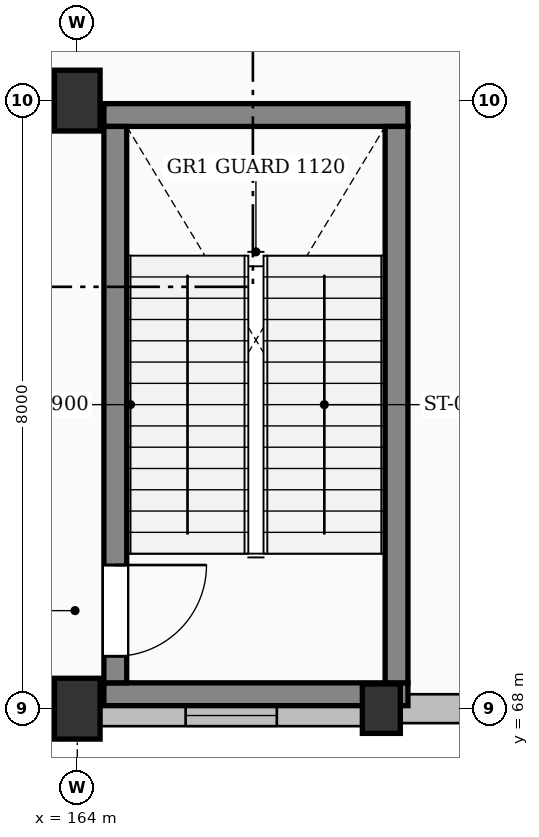
"""IFC4 building model, lengths in metres.
Left out: names, types, materials, properties, quantities, classifications, styles, units other than length and angle.
Written with IfcOpenShell. Run it as: python <this file> out.ifc"""

import sys

from ifc_helpers import new_model, si_unit, direction, frame, frame_2d, origin, origin_2d, place, context, subcontext, project, spatial, rectangle, extrude, element, fill, save


model = new_model("IFC4")
c1 = context("Model", 3, precision=1e-05, world=origin(), true_north=direction((0.0, 1.0)))
c2 = subcontext(c1, "Body", "Model", "MODEL_VIEW")
j1 = project(units=[si_unit("LENGTHUNIT", "METRE"), si_unit("PLANEANGLEUNIT", "RADIAN")], contexts=[c1])
p1 = place(None, origin())
s1 = spatial("IfcSite", under=j1, at=p1, CompositionType="ELEMENT")
p2 = place(p1, origin())
s2 = spatial("IfcBuilding", under=s1, at=p2, CompositionType="ELEMENT")
p3 = place(p2, frame((0.0, 0.0, 9.3)))
s3 = spatial("IfcBuildingStorey", under=s2, at=p3, CompositionType="ELEMENT", Elevation=9.3)
for number, where, z_axis, x_axis in (
    (1, (164.0, 68.0, 0.0), (0.0, 0.0, 1.0), (1.0, 0.0, 0.0)),
    (2, (164.0, 76.0, 0.0), (0.0, 0.0, 1.0), (1.0, 0.0, 0.0)),
):
    element("IfcColumn", number, at=place(p3, frame(where, z_axis=z_axis, x_axis=x_axis)), inside=s3, PredefinedType="COLUMN", context=c2, shape_type="SweptSolid", body=[
        extrude(rectangle(XDim=0.6, YDim=0.8, at=origin_2d()), origin(), (0.0, 0.0, 1.0), 4.5),
    ])
p4 = place(p3, frame((168.0, 68.0, 0.0), z_axis=(0.0, 0.0, 1.0), x_axis=(1.0, 0.0, 0.0)))
e3 = element("IfcColumn", 3, at=p4, inside=s3, PredefinedType="PILASTER", context=c2, shape_type="SweptSolid", body=[
    extrude(rectangle(XDim=0.5, YDim=0.65, at=origin_2d()), origin(), (0.0, 0.0, 1.0), 4.5),
])
p5 = place(p3, frame((171.725, 68.0, 0.0), z_axis=(0.0, 0.0, 1.0), x_axis=(-1.0, 0.0, 0.0)))
e4 = element("IfcWall", 4, at=p5, inside=s3, PredefinedType="SOLIDWALL", context=c2, shape_type="SweptSolid", body=[
    extrude(rectangle(XDim=3.475, YDim=0.38, at=frame_2d((1.738, 0.0))), origin(), (0.0, 0.0, 1.0), 3.705),
])
p6 = place(p5, frame((1.288, 0.0, 0.95)))
e5 = element("IfcOpeningElement", 5, at=p6, cuts=e4, PredefinedType="OPENING", context=c2, shape_type="SweptSolid", body=[
    extrude(rectangle(XDim=0.9, YDim=1.8, at=frame_2d((0.45, 0.9))), frame((0.0, 0.2, 0.0), z_axis=(0.0, -1.0, 0.0), x_axis=(1.0, 0.0, 0.0)), (0.0, 0.0, 1.0), 0.4),
])
p7 = place(p3, frame((167.75, 67.91, 0.0), z_axis=(0.0, 0.0, 1.0), x_axis=(-1.0, 0.0, 0.0)))
e6 = element("IfcWall", 6, at=p7, inside=s3, PredefinedType="SOLIDWALL", context=c2, shape_type="SweptSolid", body=[
    extrude(rectangle(XDim=3.45, YDim=0.28, at=frame_2d((1.725, 0.0))), origin(), (0.0, 0.0, 1.0), 3.705),
])
p8 = place(p7, frame((1.125, 0.0, 0.95)))
e7 = element("IfcOpeningElement", 7, at=p8, cuts=e6, PredefinedType="OPENING", context=c2, shape_type="SweptSolid", body=[
    extrude(rectangle(XDim=1.2, YDim=1.8, at=frame_2d((0.6, 0.9))), frame((0.0, 0.15, 0.0), z_axis=(0.0, -1.0, 0.0), x_axis=(1.0, 0.0, 0.0)), (0.0, 0.0, 1.0), 0.3),
])
p9 = place(p3, frame((163.7, 68.0, 0.0), z_axis=(0.0, 0.0, 1.0), x_axis=(-1.0, 0.0, 0.0)))
e8 = element("IfcWall", 8, at=p9, inside=s3, PredefinedType="SOLIDWALL", context=c2, shape_type="SweptSolid", body=[
    extrude(rectangle(XDim=3.5, YDim=0.38, at=frame_2d((1.75, 0.0))), origin(), (0.0, 0.0, 1.0), 3.755),
])
p10 = place(p9, frame((0.85, 0.0, 0.95)))
e9 = element("IfcOpeningElement", 9, at=p10, cuts=e8, PredefinedType="OPENING", context=c2, shape_type="SweptSolid", body=[
    extrude(rectangle(XDim=1.8, YDim=1.8, at=frame_2d((0.9, 0.9))), frame((0.0, 0.2, 0.0), z_axis=(0.0, -1.0, 0.0), x_axis=(1.0, 0.0, 0.0)), (0.0, 0.0, 1.0), 0.4),
])
for number, where, z_axis, x_axis in (
    (10, (164.35, 68.19, 0.0), (0.0, 0.0, 1.0), (1.0, 0.0, 0.0)),
    (11, (168.35, 75.81, 0.0), (0.0, 0.0, 1.0), (-1.0, 0.0, 0.0)),
):
    element("IfcWall", number, at=place(p3, frame(where, z_axis=z_axis, x_axis=x_axis)), inside=s3, PredefinedType="SHEAR", context=c2, shape_type="SweptSolid", body=[
        extrude(rectangle(XDim=4.0, YDim=0.3, at=frame_2d((2.0, 0.0))), origin(), (0.0, 0.0, 1.0), 4.27),
    ])
p11 = place(p3, frame((164.5, 75.66, 0.0), z_axis=(0.0, 0.0, 1.0), x_axis=(0.0, -1.0, 0.0)))
e12 = element("IfcWall", 12, at=p11, inside=s3, PredefinedType="SHEAR", context=c2, shape_type="SweptSolid", body=[
    extrude(rectangle(XDim=7.32, YDim=0.3, at=frame_2d((3.66, 0.0))), origin(), (0.0, 0.0, 1.0), 4.27),
])
p12 = place(p11, frame((5.77, 0.0, 0.0)))
e13 = element("IfcOpeningElement", 13, at=p12, cuts=e12, PredefinedType="OPENING", context=c2, shape_type="SweptSolid", body=[
    extrude(rectangle(XDim=1.2, YDim=2.15, at=frame_2d((0.6, 1.075))), frame((0.0, 0.16, 0.0), z_axis=(0.0, -1.0, 0.0), x_axis=(1.0, 0.0, 0.0)), (0.0, 0.0, 1.0), 0.32),
])
p13 = place(p3, frame((168.2, 75.66, 0.0), z_axis=(0.0, 0.0, 1.0), x_axis=(0.0, -1.0, 0.0)))
e14 = element("IfcWall", 14, at=p13, inside=s3, PredefinedType="SHEAR", context=c2, shape_type="SweptSolid", body=[
    extrude(rectangle(XDim=7.32, YDim=0.3, at=frame_2d((3.66, 0.0))), origin(), (0.0, 0.0, 1.0), 4.27),
])
p14 = place(p8, origin())
e15 = element("IfcWindow", 15, at=p14, inside=s3, PartitioningType="SINGLE_PANEL", PredefinedType="WINDOW", context=c2, shape_type="SweptSolid", body=[
    extrude(rectangle(XDim=1.2, YDim=1.8, at=frame_2d((0.6, 0.9))), frame((0.0, 0.03, 0.0), z_axis=(0.0, -1.0, 0.0), x_axis=(1.0, 0.0, 0.0)), (0.0, 0.0, 1.0), 0.06),
])
fill(e7, e15)
p15 = place(p12, origin())
e16 = element("IfcDoor", 16, at=p15, inside=s3, OperationType="SINGLE_SWING_LEFT", PredefinedType="DOOR", context=c2, shape_type="SweptSolid", body=[
    extrude(rectangle(XDim=1.2, YDim=2.15, at=frame_2d((0.6, 1.075))), frame((0.0, 0.025, 0.0), z_axis=(0.0, -1.0, 0.0), x_axis=(1.0, 0.0, 0.0)), (0.0, 0.0, 1.0), 0.05),
])
fill(e13, e16)
save(model, sys.argv[1])
